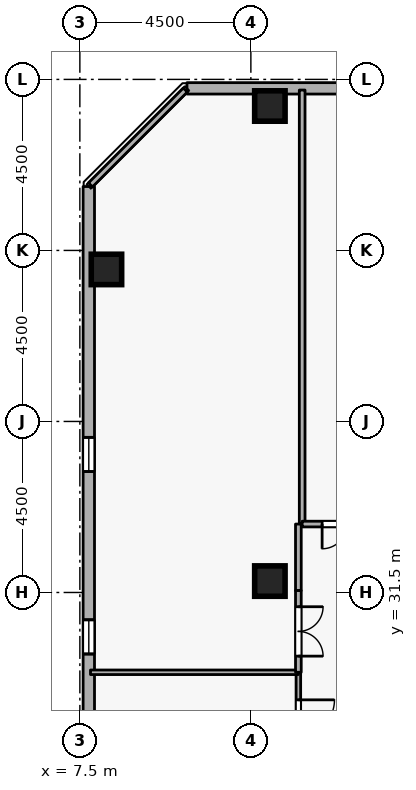
"""IFC4 building model, lengths in metres.
Left out: names, types, materials, properties, quantities, classifications, styles, units other than length and angle.
Written with IfcOpenShell. Run it as: python <this file> out.ifc"""

import sys

from ifc_helpers import new_model, si_unit, direction, frame, frame_2d, origin, origin_2d, place, context, subcontext, project, spatial, rectangle, extrude, element, fill, save


model = new_model("IFC4")
c1 = context("Model", 3, precision=1e-05, world=origin(), true_north=direction((0.0, 1.0)))
c2 = subcontext(c1, "Body", "Model", "MODEL_VIEW")
j1 = project(units=[si_unit("LENGTHUNIT", "METRE"), si_unit("PLANEANGLEUNIT", "RADIAN")], contexts=[c1])
p1 = place(None, origin())
s1 = spatial("IfcSite", under=j1, at=p1, CompositionType="ELEMENT")
p2 = place(p1, origin())
s2 = spatial("IfcBuilding", under=s1, at=p2, CompositionType="ELEMENT")
p3 = place(p2, frame((0.0, 0.0, 276.3)))
s3 = spatial("IfcBuildingStorey", under=s2, at=p3, CompositionType="ELEMENT", Elevation=276.3)
for number, where, z_axis, x_axis in (
    (1, (12.5, 44.3, 0.0), (0.0, 0.0, 1.0), (1.0, 0.0, 0.0)),
    (2, (8.2, 40.0, 0.0), (0.0, 0.0, 1.0), (1.0, 0.0, 0.0)),
    (3, (12.5, 31.8, 0.0), (0.0, 0.0, 1.0), (1.0, 0.0, 0.0)),
):
    element("IfcColumn", number, at=place(p3, frame(where, z_axis=z_axis, x_axis=x_axis)), inside=s3, PredefinedType="COLUMN", context=c2, shape_type="SweptSolid", body=[
        extrude(rectangle(XDim=0.8, YDim=0.8, at=origin_2d()), origin(), (0.0, 0.0, 1.0), 3.6),
    ])
p4 = place(p3, frame((46.681, 44.765, 0.0), z_axis=(0.0, 0.0, 1.0), x_axis=(-1.0, 0.0, 0.0)))
e4 = element("IfcWall", 4, at=p4, inside=s3, PredefinedType="STANDARD", context=c2, shape_type="SweptSolid", body=[
    extrude(rectangle(XDim=36.363, YDim=0.3, at=frame_2d((18.181, 0.0))), origin(), (0.0, 0.0, 1.0), 2.66),
])
p5 = place(p4, frame((1.8, 0.0, 0.72)))
e5 = element("IfcOpeningElement", 5, at=p5, cuts=e4, PredefinedType="OPENING", context=c2, shape_type="SweptSolid", body=[
    extrude(rectangle(XDim=0.9, YDim=1.75, at=frame_2d((0.45, 0.875))), frame((0.0, 0.16, 0.0), z_axis=(0.0, -1.0, 0.0), x_axis=(1.0, 0.0, 0.0)), (0.0, 0.0, 1.0), 0.32),
])
p6 = place(p4, frame((11.4, 0.0, 0.72)))
e6 = element("IfcOpeningElement", 6, at=p6, cuts=e4, PredefinedType="OPENING", context=c2, shape_type="SweptSolid", body=[
    extrude(rectangle(XDim=0.9, YDim=1.75, at=frame_2d((0.45, 0.875))), frame((0.0, 0.16, 0.0), z_axis=(0.0, -1.0, 0.0), x_axis=(1.0, 0.0, 0.0)), (0.0, 0.0, 1.0), 0.32),
])
p7 = place(p4, frame((16.2, 0.0, 0.72)))
e7 = element("IfcOpeningElement", 7, at=p7, cuts=e4, PredefinedType="OPENING", context=c2, shape_type="SweptSolid", body=[
    extrude(rectangle(XDim=0.9, YDim=1.75, at=frame_2d((0.45, 0.875))), frame((0.0, 0.16, 0.0), z_axis=(0.0, -1.0, 0.0), x_axis=(1.0, 0.0, 0.0)), (0.0, 0.0, 1.0), 0.32),
])
p8 = place(p4, frame((25.8, 0.0, 0.72)))
e8 = element("IfcOpeningElement", 8, at=p8, cuts=e4, PredefinedType="OPENING", context=c2, shape_type="SweptSolid", body=[
    extrude(rectangle(XDim=0.9, YDim=1.75, at=frame_2d((0.45, 0.875))), frame((0.0, 0.16, 0.0), z_axis=(0.0, -1.0, 0.0), x_axis=(1.0, 0.0, 0.0)), (0.0, 0.0, 1.0), 0.32),
])
p9 = place(p3, frame((7.735, 42.181, 0.0), z_axis=(0.0, 0.0, 1.0), x_axis=(0.0, -1.0, 0.0)))
e9 = element("IfcWall", 9, at=p9, inside=s3, PredefinedType="STANDARD", context=c2, shape_type="SweptSolid", body=[
    extrude(rectangle(XDim=36.363, YDim=0.3, at=frame_2d((18.181, 0.0))), origin(), (0.0, 0.0, 1.0), 2.66),
])
p10 = place(p9, frame((6.6, 0.0, 0.72)))
e10 = element("IfcOpeningElement", 10, at=p10, cuts=e9, PredefinedType="OPENING", context=c2, shape_type="SweptSolid", body=[
    extrude(rectangle(XDim=0.9, YDim=1.75, at=frame_2d((0.45, 0.875))), frame((0.0, 0.16, 0.0), z_axis=(0.0, -1.0, 0.0), x_axis=(1.0, 0.0, 0.0)), (0.0, 0.0, 1.0), 0.32),
])
p11 = place(p9, frame((11.4, 0.0, 0.72)))
e11 = element("IfcOpeningElement", 11, at=p11, cuts=e9, PredefinedType="OPENING", context=c2, shape_type="SweptSolid", body=[
    extrude(rectangle(XDim=0.9, YDim=1.75, at=frame_2d((0.45, 0.875))), frame((0.0, 0.16, 0.0), z_axis=(0.0, -1.0, 0.0), x_axis=(1.0, 0.0, 0.0)), (0.0, 0.0, 1.0), 0.32),
])
p12 = place(p9, frame((21.0, 0.0, 0.72)))
e12 = element("IfcOpeningElement", 12, at=p12, cuts=e9, PredefinedType="OPENING", context=c2, shape_type="SweptSolid", body=[
    extrude(rectangle(XDim=0.9, YDim=1.75, at=frame_2d((0.45, 0.875))), frame((0.0, 0.16, 0.0), z_axis=(0.0, -1.0, 0.0), x_axis=(1.0, 0.0, 0.0)), (0.0, 0.0, 1.0), 0.32),
])
p13 = place(p9, frame((25.8, 0.0, 0.72)))
e13 = element("IfcOpeningElement", 13, at=p13, cuts=e9, PredefinedType="OPENING", context=c2, shape_type="SweptSolid", body=[
    extrude(rectangle(XDim=0.9, YDim=1.75, at=frame_2d((0.45, 0.875))), frame((0.0, 0.16, 0.0), z_axis=(0.0, -1.0, 0.0), x_axis=(1.0, 0.0, 0.0)), (0.0, 0.0, 1.0), 0.32),
])
p14 = place(p9, frame((30.6, 0.0, 0.72)))
e14 = element("IfcOpeningElement", 14, at=p14, cuts=e9, PredefinedType="OPENING", context=c2, shape_type="SweptSolid", body=[
    extrude(rectangle(XDim=0.9, YDim=1.75, at=frame_2d((0.45, 0.875))), frame((0.0, 0.16, 0.0), z_axis=(0.0, -1.0, 0.0), x_axis=(1.0, 0.0, 0.0)), (0.0, 0.0, 1.0), 0.32),
])
p15 = place(p3, frame((13.35, 33.3, 0.0), z_axis=(0.0, 0.0, 1.0), x_axis=(0.0, 1.0, 0.0)))
e15 = element("IfcWall", 15, at=p15, inside=s3, PredefinedType="PARTITIONING", context=c2, shape_type="SweptSolid", body=[
    extrude(rectangle(XDim=11.42, YDim=0.15, at=frame_2d((5.71, 0.0))), origin(), (0.0, 0.0, 1.0), 3.26),
])
p16 = place(p3, frame((15.7, 33.3, 0.0), z_axis=(0.0, 0.0, 1.0), x_axis=(-1.0, 0.0, 0.0)))
e16 = element("IfcWall", 16, at=p16, inside=s3, PredefinedType="PARTITIONING", context=c2, shape_type="SweptSolid", body=[
    extrude(rectangle(XDim=2.35, YDim=0.15, at=frame_2d((1.175, 0.0))), origin(), (0.0, 0.0, 1.0), 3.26),
])
p17 = place(p16, frame((0.525, 0.0, 0.0)))
e17 = element("IfcOpeningElement", 17, at=p17, cuts=e16, PredefinedType="OPENING", context=c2, shape_type="SweptSolid", body=[
    extrude(rectangle(XDim=1.3, YDim=2.12, at=frame_2d((0.65, 1.06))), frame((0.0, 0.085, 0.0), z_axis=(0.0, -1.0, 0.0), x_axis=(1.0, 0.0, 0.0)), (0.0, 0.0, 1.0), 0.17),
])
p18 = place(p3, frame((13.25, 29.4, 0.0), z_axis=(0.0, 0.0, 1.0), x_axis=(0.0, -1.0, 0.0)))
e18 = element("IfcWall", 18, at=p18, inside=s3, PredefinedType="PARTITIONING", context=c2, shape_type="SweptSolid", body=[
    extrude(rectangle(XDim=2.4, YDim=0.12, at=frame_2d((1.2, 0.0))), origin(), (0.0, 0.0, 1.0), 3.26),
])
p19 = place(p18, frame((0.725, 0.0, 0.0)))
e19 = element("IfcOpeningElement", 19, at=p19, cuts=e18, PredefinedType="OPENING", context=c2, shape_type="SweptSolid", body=[
    extrude(rectangle(XDim=0.95, YDim=2.1, at=frame_2d((0.475, 1.05))), frame((0.0, 0.07, 0.0), z_axis=(0.0, -1.0, 0.0), x_axis=(1.0, 0.0, 0.0)), (0.0, 0.0, 1.0), 0.14),
])
p20 = place(p3, frame((7.78, 29.4, 0.0), z_axis=(0.0, 0.0, 1.0), x_axis=(1.0, 0.0, 0.0)))
e20 = element("IfcWall", 20, at=p20, inside=s3, PredefinedType="PARTITIONING", context=c2, shape_type="SweptSolid", body=[
    extrude(rectangle(XDim=5.47, YDim=0.12, at=frame_2d((2.735, 0.0))), origin(), (0.0, 0.0, 1.0), 3.26),
])
p21 = place(p3, frame((7.78, 42.225, 0.0), z_axis=(0.0, 0.0, 1.0), x_axis=(0.707106781187, 0.707106781187, 0.0)))
e21 = element("IfcWall", 21, at=p21, inside=s3, PredefinedType="PARTITIONING", context=c2, shape_type="SweptSolid", body=[
    extrude(rectangle(XDim=3.528, YDim=0.15, at=frame_2d((1.764, 0.0))), origin(), (0.0, 0.0, 1.0), 3.26),
])
p22 = place(p3, frame((13.25, 33.3, 0.0), z_axis=(0.0, 0.0, 1.0), x_axis=(0.0, -1.0, 0.0)))
e22 = element("IfcWall", 22, at=p22, inside=s3, PredefinedType="PARTITIONING", context=c2, shape_type="SweptSolid", body=[
    extrude(rectangle(XDim=1.75, YDim=0.15, at=frame_2d((0.875, 0.0))), origin(), (0.0, 0.0, 1.0), 3.26),
])
p23 = place(p3, frame((13.25, 31.55, 0.0), z_axis=(0.0, 0.0, 1.0), x_axis=(0.0, -1.0, 0.0)))
e23 = element("IfcWall", 23, at=p23, inside=s3, PredefinedType="PARTITIONING", context=c2, shape_type="SweptSolid", body=[
    extrude(rectangle(XDim=2.15, YDim=0.15, at=frame_2d((1.075, 0.0))), origin(), (0.0, 0.0, 1.0), 3.26),
])
p24 = place(p23, frame((0.425, 0.0, 0.0)))
e24 = element("IfcOpeningElement", 24, at=p24, cuts=e23, PredefinedType="OPENING", context=c2, shape_type="SweptSolid", body=[
    extrude(rectangle(XDim=1.3, YDim=2.12, at=frame_2d((0.65, 1.06))), frame((0.0, 0.085, 0.0), z_axis=(0.0, -1.0, 0.0), x_axis=(1.0, 0.0, 0.0)), (0.0, 0.0, 1.0), 0.17),
])
p25 = place(p10, origin())
e25 = element("IfcWindow", 25, at=p25, inside=s3, PartitioningType="SINGLE_PANEL", PredefinedType="WINDOW", context=c2, shape_type="SweptSolid", body=[
    extrude(rectangle(XDim=0.9, YDim=1.75, at=frame_2d((0.45, 0.875))), frame((0.0, 0.03, 0.0), z_axis=(0.0, -1.0, 0.0), x_axis=(1.0, 0.0, 0.0)), (0.0, 0.0, 1.0), 0.06),
])
fill(e10, e25)
p26 = place(p11, origin())
e26 = element("IfcWindow", 26, at=p26, inside=s3, PartitioningType="SINGLE_PANEL", PredefinedType="WINDOW", context=c2, shape_type="SweptSolid", body=[
    extrude(rectangle(XDim=0.9, YDim=1.75, at=frame_2d((0.45, 0.875))), frame((0.0, 0.03, 0.0), z_axis=(0.0, -1.0, 0.0), x_axis=(1.0, 0.0, 0.0)), (0.0, 0.0, 1.0), 0.06),
])
fill(e11, e26)
p27 = place(p17, origin())
e27 = element("IfcDoor", 27, at=p27, inside=s3, OperationType="DOUBLE_DOOR_SINGLE_SWING", PredefinedType="DOOR", context=c2, shape_type="SweptSolid", body=[
    extrude(rectangle(XDim=1.3, YDim=2.12, at=frame_2d((0.65, 1.06))), frame((0.0, 0.025, 0.0), z_axis=(0.0, -1.0, 0.0), x_axis=(1.0, 0.0, 0.0)), (0.0, 0.0, 1.0), 0.05),
])
fill(e17, e27)
p28 = place(p19, origin())
e28 = element("IfcDoor", 28, at=p28, inside=s3, OperationType="SINGLE_SWING_LEFT", PredefinedType="DOOR", context=c2, shape_type="SweptSolid", body=[
    extrude(rectangle(XDim=0.95, YDim=2.1, at=frame_2d((0.475, 1.05))), frame((0.0, 0.025, 0.0), z_axis=(0.0, -1.0, 0.0), x_axis=(1.0, 0.0, 0.0)), (0.0, 0.0, 1.0), 0.05),
])
fill(e19, e28)
p29 = place(p24, origin())
e29 = element("IfcDoor", 29, at=p29, inside=s3, OperationType="DOUBLE_DOOR_SINGLE_SWING", PredefinedType="DOOR", context=c2, shape_type="SweptSolid", body=[
    extrude(rectangle(XDim=1.3, YDim=2.12, at=frame_2d((0.65, 1.06))), frame((0.0, 0.025, 0.0), z_axis=(0.0, -1.0, 0.0), x_axis=(1.0, 0.0, 0.0)), (0.0, 0.0, 1.0), 0.05),
])
fill(e24, e29)
save(model, sys.argv[1])
